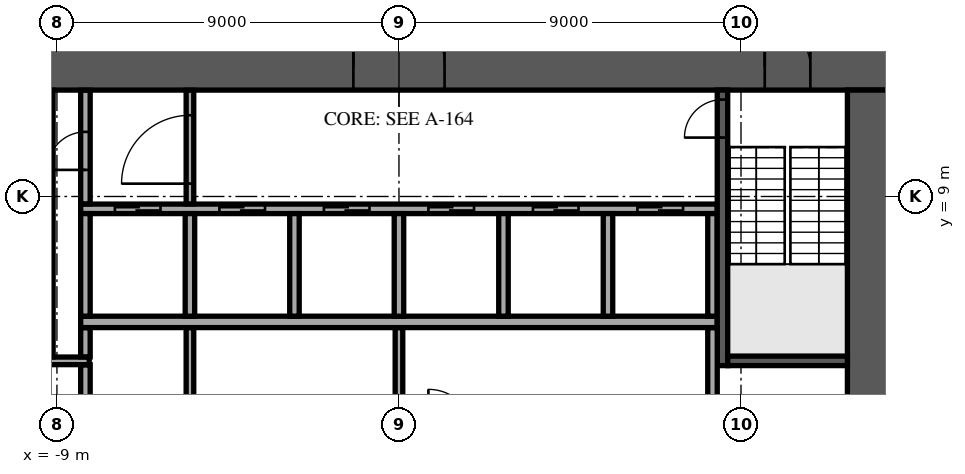
"""IFC4 building model, lengths in metres.
Left out: names, types, materials, properties, quantities, classifications, styles, units other than length and angle.
Written with IfcOpenShell. Run it as: python <this file> out.ifc"""

import sys

from ifc_helpers import new_model, si_unit, direction, frame, frame_2d, origin, place, context, subcontext, project, spatial, rectangle, extrude, element, fill, save


model = new_model("IFC4")
c1 = context("Model", 3, precision=1e-05, world=origin(), true_north=direction((0.0, 1.0)))
c2 = subcontext(c1, "Body", "Model", "MODEL_VIEW")
j1 = project(units=[si_unit("LENGTHUNIT", "METRE"), si_unit("PLANEANGLEUNIT", "RADIAN")], contexts=[c1])
p1 = place(None, origin())
s1 = spatial("IfcSite", under=j1, at=p1, CompositionType="ELEMENT")
p2 = place(p1, origin())
s2 = spatial("IfcBuilding", under=s1, at=p2, CompositionType="ELEMENT")
p3 = place(p2, frame((0.0, 0.0, 4.5)))
s3 = spatial("IfcBuildingStorey", under=s2, at=p3, CompositionType="ELEMENT", Elevation=4.5)
p4 = place(p3, frame((-13.0, 12.4, 0.0), z_axis=(0.0, 0.0, 1.0), x_axis=(1.0, 0.0, 0.0)))
e1 = element("IfcWall", 1, at=p4, inside=s3, PredefinedType="SHEAR", context=c2, shape_type="SweptSolid", body=[
    extrude(rectangle(XDim=26.0, YDim=1.2, at=frame_2d((13.0, 0.0))), origin(), (0.0, 0.0, 1.0), 4.1),
])
p5 = place(p4, frame((11.8, 0.0, 0.0)))
e2 = element("IfcOpeningElement", 2, at=p5, cuts=e1, PredefinedType="OPENING", context=c2, shape_type="SweptSolid", body=[
    extrude(rectangle(XDim=2.4, YDim=2.4, at=frame_2d((1.2, 1.2))), frame((0.0, 0.61, 0.0), z_axis=(0.0, -1.0, 0.0), x_axis=(1.0, 0.0, 0.0)), (0.0, 0.0, 1.0), 1.22),
])
p6 = place(p4, frame((22.625, 0.0, 0.0)))
e3 = element("IfcOpeningElement", 3, at=p6, cuts=e1, PredefinedType="OPENING", context=c2, shape_type="SweptSolid", body=[
    extrude(rectangle(XDim=1.2, YDim=2.1, at=frame_2d((0.6, 1.05))), frame((0.0, 0.61, 0.0), z_axis=(0.0, -1.0, 0.0), x_axis=(1.0, 0.0, 0.0)), (0.0, 0.0, 1.0), 1.22),
])
p7 = place(p4, frame((1.6, 0.0, 0.0)))
e4 = element("IfcOpeningElement", 4, at=p7, cuts=e1, PredefinedType="OPENING", context=c2, shape_type="SweptSolid", body=[
    extrude(rectangle(XDim=1.0, YDim=2.1, at=frame_2d((0.5, 1.05))), frame((0.0, 0.61, 0.0), z_axis=(0.0, -1.0, 0.0), x_axis=(1.0, 0.0, 0.0)), (0.0, 0.0, 1.0), 1.22),
])
p8 = place(p3, frame((12.4, -11.8, 0.0), z_axis=(0.0, 0.0, 1.0), x_axis=(0.0, 1.0, 0.0)))
e5 = element("IfcWall", 5, at=p8, inside=s3, PredefinedType="SHEAR", context=c2, shape_type="SweptSolid", body=[
    extrude(rectangle(XDim=23.6, YDim=1.2, at=frame_2d((11.8, 0.0))), origin(), (0.0, 0.0, 1.0), 4.1),
])
p9 = place(p8, frame((10.6, 0.0, 0.0)))
e6 = element("IfcOpeningElement", 6, at=p9, cuts=e5, PredefinedType="OPENING", context=c2, shape_type="SweptSolid", body=[
    extrude(rectangle(XDim=2.4, YDim=2.4, at=frame_2d((1.2, 1.2))), frame((0.0, 0.61, 0.0), z_axis=(0.0, -1.0, 0.0), x_axis=(1.0, 0.0, 0.0)), (0.0, 0.0, 1.0), 1.22),
])
p10 = place(p3, frame((-8.375, 5.7, 0.0), z_axis=(0.0, 0.0, 1.0), x_axis=(1.0, 0.0, 0.0)))
e7 = element("IfcWall", 7, at=p10, inside=s3, PredefinedType="SOLIDWALL", context=c2, shape_type="SweptSolid", body=[
    extrude(rectangle(XDim=16.75, YDim=0.3, at=frame_2d((8.375, 0.0))), origin(), (0.0, 0.0, 1.0), 4.1),
])
p11 = place(p3, frame((-8.375, 8.675, 0.0), z_axis=(0.0, 0.0, 1.0), x_axis=(1.0, 0.0, 0.0)))
e8 = element("IfcWall", 8, at=p11, inside=s3, PredefinedType="SOLIDWALL", context=c2, shape_type="SweptSolid", body=[
    extrude(rectangle(XDim=16.75, YDim=0.25, at=frame_2d((8.375, 0.0))), origin(), (0.0, 0.0, 1.0), 4.1),
])
p12 = place(p11, frame((0.9, 0.0, 0.0)))
e9 = element("IfcOpeningElement", 9, at=p12, cuts=e8, PredefinedType="OPENING", context=c2, shape_type="SweptSolid", body=[
    extrude(rectangle(XDim=1.2, YDim=2.1, at=frame_2d((0.6, 1.05))), frame((0.0, 0.135, 0.0), z_axis=(0.0, -1.0, 0.0), x_axis=(1.0, 0.0, 0.0)), (0.0, 0.0, 1.0), 0.27),
])
p13 = place(p11, frame((3.65, 0.0, 0.0)))
e10 = element("IfcOpeningElement", 10, at=p13, cuts=e8, PredefinedType="OPENING", context=c2, shape_type="SweptSolid", body=[
    extrude(rectangle(XDim=1.2, YDim=2.1, at=frame_2d((0.6, 1.05))), frame((0.0, 0.135, 0.0), z_axis=(0.0, -1.0, 0.0), x_axis=(1.0, 0.0, 0.0)), (0.0, 0.0, 1.0), 0.27),
])
p14 = place(p11, frame((6.4, 0.0, 0.0)))
e11 = element("IfcOpeningElement", 11, at=p14, cuts=e8, PredefinedType="OPENING", context=c2, shape_type="SweptSolid", body=[
    extrude(rectangle(XDim=1.2, YDim=2.1, at=frame_2d((0.6, 1.05))), frame((0.0, 0.135, 0.0), z_axis=(0.0, -1.0, 0.0), x_axis=(1.0, 0.0, 0.0)), (0.0, 0.0, 1.0), 0.27),
])
p15 = place(p11, frame((9.15, 0.0, 0.0)))
e12 = element("IfcOpeningElement", 12, at=p15, cuts=e8, PredefinedType="OPENING", context=c2, shape_type="SweptSolid", body=[
    extrude(rectangle(XDim=1.2, YDim=2.1, at=frame_2d((0.6, 1.05))), frame((0.0, 0.135, 0.0), z_axis=(0.0, -1.0, 0.0), x_axis=(1.0, 0.0, 0.0)), (0.0, 0.0, 1.0), 0.27),
])
p16 = place(p11, frame((11.9, 0.0, 0.0)))
e13 = element("IfcOpeningElement", 13, at=p16, cuts=e8, PredefinedType="OPENING", context=c2, shape_type="SweptSolid", body=[
    extrude(rectangle(XDim=1.2, YDim=2.1, at=frame_2d((0.6, 1.05))), frame((0.0, 0.135, 0.0), z_axis=(0.0, -1.0, 0.0), x_axis=(1.0, 0.0, 0.0)), (0.0, 0.0, 1.0), 0.27),
])
p17 = place(p11, frame((14.65, 0.0, 0.0)))
e14 = element("IfcOpeningElement", 14, at=p17, cuts=e8, PredefinedType="OPENING", context=c2, shape_type="SweptSolid", body=[
    extrude(rectangle(XDim=1.2, YDim=2.1, at=frame_2d((0.6, 1.05))), frame((0.0, 0.135, 0.0), z_axis=(0.0, -1.0, 0.0), x_axis=(1.0, 0.0, 0.0)), (0.0, 0.0, 1.0), 0.27),
])
for number, where, z_axis, x_axis in (
    (15, (-8.25, 5.85, 0.0), (0.0, 0.0, 1.0), (0.0, 1.0, 0.0)),
    (16, (-5.5, 5.85, 0.0), (0.0, 0.0, 1.0), (0.0, 1.0, 0.0)),
    (17, (-2.75, 5.85, 0.0), (0.0, 0.0, 1.0), (0.0, 1.0, 0.0)),
    (18, (0.0, 5.85, 0.0), (0.0, 0.0, 1.0), (0.0, 1.0, 0.0)),
    (19, (2.75, 5.85, 0.0), (0.0, 0.0, 1.0), (0.0, 1.0, 0.0)),
    (20, (5.5, 5.85, 0.0), (0.0, 0.0, 1.0), (0.0, 1.0, 0.0)),
    (21, (8.25, 5.85, 0.0), (0.0, 0.0, 1.0), (0.0, 1.0, 0.0)),
):
    element("IfcWall", number, at=place(p3, frame(where, z_axis=z_axis, x_axis=x_axis)), inside=s3, PredefinedType="SOLIDWALL", context=c2, shape_type="SweptSolid", body=[
        extrude(rectangle(XDim=2.7, YDim=0.25, at=frame_2d((1.35, 0.0))), origin(), (0.0, 0.0, 1.0), 4.1),
    ])
p18 = place(p3, frame((8.512, 4.55, 0.0), z_axis=(0.0, 0.0, 1.0), x_axis=(0.0, 1.0, 0.0)))
e22 = element("IfcWall", 22, at=p18, inside=s3, PredefinedType="SOLIDWALL", context=c2, shape_type="SweptSolid", body=[
    extrude(rectangle(XDim=7.25, YDim=0.275, at=frame_2d((3.625, 0.0))), origin(), (0.0, 0.0, 1.0), 4.1),
])
p19 = place(p18, frame((6.0, 0.0, 0.0)))
e23 = element("IfcOpeningElement", 23, at=p19, cuts=e22, PredefinedType="OPENING", context=c2, shape_type="SweptSolid", body=[
    extrude(rectangle(XDim=1.0, YDim=2.1, at=frame_2d((0.5, 1.05))), frame((0.0, 0.147, 0.0), z_axis=(0.0, -1.0, 0.0), x_axis=(1.0, 0.0, 0.0)), (0.0, 0.0, 1.0), 0.295),
])
p20 = place(p3, frame((8.65, 4.675, 0.0), z_axis=(0.0, 0.0, 1.0), x_axis=(1.0, 0.0, 0.0)))
e24 = element("IfcWall", 24, at=p20, inside=s3, PredefinedType="SOLIDWALL", context=c2, shape_type="SweptSolid", body=[
    extrude(rectangle(XDim=3.15, YDim=0.25, at=frame_2d((1.575, 0.0))), origin(), (0.0, 0.0, 1.0), 4.1),
])
p21 = place(p3, frame((-8.25, 2.855, 0.0), z_axis=(0.0, 0.0, 1.0), x_axis=(0.0, 1.0, 0.0)))
e25 = element("IfcWall", 25, at=p21, inside=s3, PredefinedType="PARTITIONING", context=c2, shape_type="SweptSolid", body=[
    extrude(rectangle(XDim=1.715, YDim=0.25, at=frame_2d((0.857, 0.0))), origin(), (0.0, 0.0, 1.0), 4.1),
])
for number, where, z_axis, x_axis in (
    (26, (-5.5, 2.855, 0.0), (0.0, 0.0, 1.0), (0.0, 1.0, 0.0)),
    (27, (0.0, 2.855, 0.0), (0.0, 0.0, 1.0), (0.0, 1.0, 0.0)),
):
    element("IfcWall", number, at=place(p3, frame(where, z_axis=z_axis, x_axis=x_axis)), inside=s3, PredefinedType="PARTITIONING", context=c2, shape_type="SweptSolid", body=[
        extrude(rectangle(XDim=2.69, YDim=0.2, at=frame_2d((1.345, 0.0))), origin(), (0.0, 0.0, 1.0), 4.1),
    ])
p22 = place(p3, frame((8.25, 2.855, 0.0), z_axis=(0.0, 0.0, 1.0), x_axis=(0.0, 1.0, 0.0)))
e28 = element("IfcWall", 28, at=p22, inside=s3, PredefinedType="PARTITIONING", context=c2, shape_type="SweptSolid", body=[
    extrude(rectangle(XDim=2.69, YDim=0.25, at=frame_2d((1.345, 0.0))), origin(), (0.0, 0.0, 1.0), 4.1),
])
p23 = place(p3, frame((-11.795, 4.675, 0.0), z_axis=(0.0, 0.0, 1.0), x_axis=(1.0, 0.0, 0.0)))
e29 = element("IfcWall", 29, at=p23, inside=s3, PredefinedType="PARTITIONING", context=c2, shape_type="SweptSolid", body=[
    extrude(rectangle(XDim=3.645, YDim=0.2, at=frame_2d((1.823, 0.0))), origin(), (0.0, 0.0, 1.0), 4.1),
])
p24 = place(p3, frame((-9.2, 4.78, 0.0), z_axis=(0.0, 0.0, 1.0), x_axis=(0.0, 1.0, 0.0)))
e30 = element("IfcWall", 30, at=p24, inside=s3, PredefinedType="PARTITIONING", context=c2, shape_type="SweptSolid", body=[
    extrude(rectangle(XDim=7.015, YDim=0.2, at=frame_2d((3.507, 0.0))), origin(), (0.0, 0.0, 1.0), 4.1),
])
p25 = place(p24, frame((2.92, 0.0, 0.0)))
e31 = element("IfcOpeningElement", 31, at=p25, cuts=e30, PredefinedType="OPENING", context=c2, shape_type="SweptSolid", body=[
    extrude(rectangle(XDim=1.0, YDim=2.1, at=frame_2d((0.5, 1.05))), frame((0.0, 0.11, 0.0), z_axis=(0.0, -1.0, 0.0), x_axis=(1.0, 0.0, 0.0)), (0.0, 0.0, 1.0), 0.22),
])
p26 = place(p3, frame((-8.25, 4.78, 0.0), z_axis=(0.0, 0.0, 1.0), x_axis=(0.0, 1.0, 0.0)))
e32 = element("IfcWall", 32, at=p26, inside=s3, PredefinedType="PARTITIONING", context=c2, shape_type="SweptSolid", body=[
    extrude(rectangle(XDim=0.765, YDim=0.25, at=frame_2d((0.382, 0.0))), origin(), (0.0, 0.0, 1.0), 4.1),
])
p27 = place(p3, frame((-8.25, 8.805, 0.0), z_axis=(0.0, 0.0, 1.0), x_axis=(0.0, 1.0, 0.0)))
e33 = element("IfcWall", 33, at=p27, inside=s3, PredefinedType="PARTITIONING", context=c2, shape_type="SweptSolid", body=[
    extrude(rectangle(XDim=2.99, YDim=0.25, at=frame_2d((1.495, 0.0))), origin(), (0.0, 0.0, 1.0), 4.1),
])
p28 = place(p27, frame((0.895, 0.0, 0.0)))
e34 = element("IfcOpeningElement", 34, at=p28, cuts=e33, PredefinedType="OPENING", context=c2, shape_type="SweptSolid", body=[
    extrude(rectangle(XDim=1.0, YDim=2.1, at=frame_2d((0.5, 1.05))), frame((0.0, 0.135, 0.0), z_axis=(0.0, -1.0, 0.0), x_axis=(1.0, 0.0, 0.0)), (0.0, 0.0, 1.0), 0.27),
])
p29 = place(p3, frame((-5.5, 8.805, 0.0), z_axis=(0.0, 0.0, 1.0), x_axis=(0.0, 1.0, 0.0)))
e35 = element("IfcWall", 35, at=p29, inside=s3, PredefinedType="PARTITIONING", context=c2, shape_type="SweptSolid", body=[
    extrude(rectangle(XDim=2.99, YDim=0.2, at=frame_2d((1.495, 0.0))), origin(), (0.0, 0.0, 1.0), 4.1),
])
p30 = place(p29, frame((0.532, 0.0, 0.0)))
e36 = element("IfcOpeningElement", 36, at=p30, cuts=e35, PredefinedType="OPENING", context=c2, shape_type="SweptSolid", body=[
    extrude(rectangle(XDim=1.8, YDim=2.1, at=frame_2d((0.9, 1.05))), frame((0.0, 0.11, 0.0), z_axis=(0.0, -1.0, 0.0), x_axis=(1.0, 0.0, 0.0)), (0.0, 0.0, 1.0), 0.22),
])
p31 = place(p5, origin())
e37 = element("IfcDoor", 37, at=p31, inside=s3, OperationType="SINGLE_SWING_LEFT", PredefinedType="DOOR", context=c2, shape_type="SweptSolid", body=[
    extrude(rectangle(XDim=2.4, YDim=2.4, at=frame_2d((1.2, 1.2))), frame((0.0, 0.025, 0.0), z_axis=(0.0, -1.0, 0.0), x_axis=(1.0, 0.0, 0.0)), (0.0, 0.0, 1.0), 0.05),
])
fill(e2, e37)
p32 = place(p6, origin())
e38 = element("IfcDoor", 38, at=p32, inside=s3, OperationType="SINGLE_SWING_LEFT", PredefinedType="DOOR", context=c2, shape_type="SweptSolid", body=[
    extrude(rectangle(XDim=1.2, YDim=2.1, at=frame_2d((0.6, 1.05))), frame((0.0, 0.025, 0.0), z_axis=(0.0, -1.0, 0.0), x_axis=(1.0, 0.0, 0.0)), (0.0, 0.0, 1.0), 0.05),
])
fill(e3, e38)
p33 = place(p12, origin())
e39 = element("IfcDoor", 39, at=p33, inside=s3, OperationType="DOUBLE_DOOR_SLIDING", PredefinedType="DOOR", context=c2, shape_type="SweptSolid", body=[
    extrude(rectangle(XDim=1.2, YDim=2.1, at=frame_2d((0.6, 1.05))), frame((0.0, 0.025, 0.0), z_axis=(0.0, -1.0, 0.0), x_axis=(1.0, 0.0, 0.0)), (0.0, 0.0, 1.0), 0.05),
])
fill(e9, e39)
p34 = place(p13, origin())
e40 = element("IfcDoor", 40, at=p34, inside=s3, OperationType="DOUBLE_DOOR_SLIDING", PredefinedType="DOOR", context=c2, shape_type="SweptSolid", body=[
    extrude(rectangle(XDim=1.2, YDim=2.1, at=frame_2d((0.6, 1.05))), frame((0.0, 0.025, 0.0), z_axis=(0.0, -1.0, 0.0), x_axis=(1.0, 0.0, 0.0)), (0.0, 0.0, 1.0), 0.05),
])
fill(e10, e40)
p35 = place(p14, origin())
e41 = element("IfcDoor", 41, at=p35, inside=s3, OperationType="DOUBLE_DOOR_SLIDING", PredefinedType="DOOR", context=c2, shape_type="SweptSolid", body=[
    extrude(rectangle(XDim=1.2, YDim=2.1, at=frame_2d((0.6, 1.05))), frame((0.0, 0.025, 0.0), z_axis=(0.0, -1.0, 0.0), x_axis=(1.0, 0.0, 0.0)), (0.0, 0.0, 1.0), 0.05),
])
fill(e11, e41)
p36 = place(p15, origin())
e42 = element("IfcDoor", 42, at=p36, inside=s3, OperationType="DOUBLE_DOOR_SLIDING", PredefinedType="DOOR", context=c2, shape_type="SweptSolid", body=[
    extrude(rectangle(XDim=1.2, YDim=2.1, at=frame_2d((0.6, 1.05))), frame((0.0, 0.025, 0.0), z_axis=(0.0, -1.0, 0.0), x_axis=(1.0, 0.0, 0.0)), (0.0, 0.0, 1.0), 0.05),
])
fill(e12, e42)
p37 = place(p16, origin())
e43 = element("IfcDoor", 43, at=p37, inside=s3, OperationType="DOUBLE_DOOR_SLIDING", PredefinedType="DOOR", context=c2, shape_type="SweptSolid", body=[
    extrude(rectangle(XDim=1.2, YDim=2.1, at=frame_2d((0.6, 1.05))), frame((0.0, 0.025, 0.0), z_axis=(0.0, -1.0, 0.0), x_axis=(1.0, 0.0, 0.0)), (0.0, 0.0, 1.0), 0.05),
])
fill(e13, e43)
p38 = place(p17, origin())
e44 = element("IfcDoor", 44, at=p38, inside=s3, OperationType="DOUBLE_DOOR_SLIDING", PredefinedType="DOOR", context=c2, shape_type="SweptSolid", body=[
    extrude(rectangle(XDim=1.2, YDim=2.1, at=frame_2d((0.6, 1.05))), frame((0.0, 0.025, 0.0), z_axis=(0.0, -1.0, 0.0), x_axis=(1.0, 0.0, 0.0)), (0.0, 0.0, 1.0), 0.05),
])
fill(e14, e44)
p39 = place(p19, origin())
e45 = element("IfcDoor", 45, at=p39, inside=s3, OperationType="SINGLE_SWING_LEFT", PredefinedType="DOOR", context=c2, shape_type="SweptSolid", body=[
    extrude(rectangle(XDim=1.0, YDim=2.1, at=frame_2d((0.5, 1.05))), frame((0.0, 0.025, 0.0), z_axis=(0.0, -1.0, 0.0), x_axis=(1.0, 0.0, 0.0)), (0.0, 0.0, 1.0), 0.05),
])
fill(e23, e45)
p40 = place(p28, origin())
e46 = element("IfcDoor", 46, at=p40, inside=s3, OperationType="SINGLE_SWING_RIGHT", PredefinedType="DOOR", context=c2, shape_type="SweptSolid", body=[
    extrude(rectangle(XDim=1.0, YDim=2.1, at=frame_2d((0.5, 1.05))), frame((0.0, 0.025, 0.0), z_axis=(0.0, -1.0, 0.0), x_axis=(1.0, 0.0, 0.0)), (0.0, 0.0, 1.0), 0.05),
])
fill(e34, e46)
p41 = place(p30, origin())
e47 = element("IfcDoor", 47, at=p41, inside=s3, OperationType="SINGLE_SWING_LEFT", PredefinedType="DOOR", context=c2, shape_type="SweptSolid", body=[
    extrude(rectangle(XDim=1.8, YDim=2.1, at=frame_2d((0.9, 1.05))), frame((0.0, 0.025, 0.0), z_axis=(0.0, -1.0, 0.0), x_axis=(1.0, 0.0, 0.0)), (0.0, 0.0, 1.0), 0.05),
])
fill(e36, e47)
save(model, sys.argv[1])
